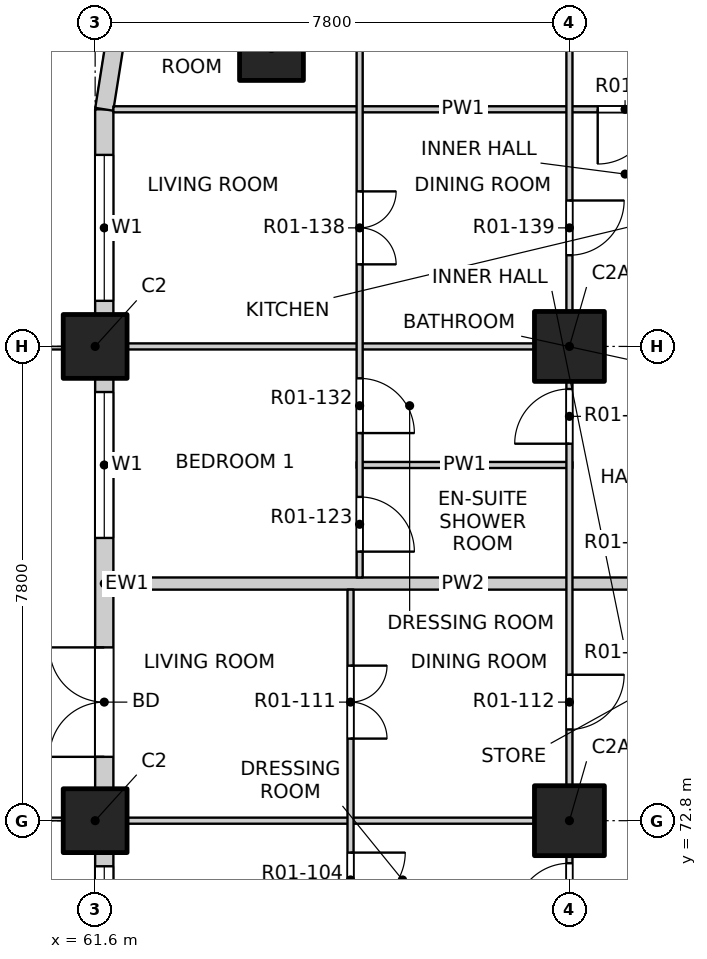
"""IFC4 building model, lengths in metres.
Left out: names, types, materials, properties, quantities, classifications, styles, units other than length and angle.
Written with IfcOpenShell. Run it as: python <this file> out.ifc"""

import sys

from ifc_helpers import new_model, si_unit, direction, frame, frame_2d, origin, origin_2d, place, context, subcontext, project, spatial, rectangle, extrude, element, fill, save


model = new_model("IFC4")
c1 = context("Model", 3, precision=1e-05, world=origin(), true_north=direction((0.0, 1.0)))
c2 = subcontext(c1, "Body", "Model", "MODEL_VIEW")
j1 = project(units=[si_unit("LENGTHUNIT", "METRE"), si_unit("PLANEANGLEUNIT", "RADIAN")], contexts=[c1])
p1 = place(None, origin())
s1 = spatial("IfcSite", under=j1, at=p1, CompositionType="ELEMENT")
p2 = place(p1, origin())
s2 = spatial("IfcBuilding", under=s1, at=p2, CompositionType="ELEMENT")
p3 = place(p2, frame((0.0, 0.0, 19.5)))
s3 = spatial("IfcBuildingStorey", under=s2, at=p3, CompositionType="ELEMENT", Elevation=19.5)
for number, where, z_axis, x_axis in (
    (1, (64.5, 85.5, -0.25), (0.0, 0.0, 1.0), (1.0, 0.0, 0.0)),
    (2, (61.6, 72.8, -0.25), (0.0, 0.0, 1.0), (1.0, 0.0, 0.0)),
    (3, (61.6, 80.6, -0.25), (0.0, 0.0, 1.0), (1.0, 0.0, 0.0)),
):
    element("IfcColumn", number, at=place(p3, frame(where, z_axis=z_axis, x_axis=x_axis)), inside=s3, PredefinedType="COLUMN", context=c2, shape_type="SweptSolid", body=[
        extrude(rectangle(XDim=1.05, YDim=1.05, at=origin_2d()), origin(), (0.0, 0.0, 1.0), 3.4),
    ])
for number, where, z_axis, x_axis in (
    (4, (69.4, 72.8, -0.25), (0.0, 0.0, 1.0), (1.0, 0.0, 0.0)),
    (5, (69.4, 80.6, -0.25), (0.0, 0.0, 1.0), (1.0, 0.0, 0.0)),
):
    element("IfcColumn", number, at=place(p3, frame(where, z_axis=z_axis, x_axis=x_axis)), inside=s3, PredefinedType="COLUMN", context=c2, shape_type="SweptSolid", body=[
        extrude(rectangle(XDim=1.15, YDim=1.15, at=origin_2d()), origin(), (0.0, 0.0, 1.0), 3.4),
    ])
p4 = place(p3, frame((61.75, 65.525, 0.0), z_axis=(0.0, 0.0, 1.0), x_axis=(0.0, 1.0, 0.0)))
e6 = element("IfcWall", 6, at=p4, inside=s3, PredefinedType="SOLIDWALL", context=c2, shape_type="SweptSolid", body=[
    extrude(rectangle(XDim=6.75, YDim=0.3, at=frame_2d((3.375, 0.0))), origin(), (0.0, 0.0, 1.0), 2.7),
])
p5 = place(p4, frame((0.225, 0.0, 0.9)))
e7 = element("IfcOpeningElement", 7, at=p5, cuts=e6, PredefinedType="OPENING", context=c2, shape_type="SweptSolid", body=[
    extrude(rectangle(XDim=2.4, YDim=1.8, at=frame_2d((1.2, 0.9))), frame((0.0, 0.16, 0.0), z_axis=(0.0, -1.0, 0.0), x_axis=(1.0, 0.0, 0.0)), (0.0, 0.0, 1.0), 0.32),
])
p6 = place(p4, frame((4.125, 0.0, 0.9)))
e8 = element("IfcOpeningElement", 8, at=p6, cuts=e6, PredefinedType="OPENING", context=c2, shape_type="SweptSolid", body=[
    extrude(rectangle(XDim=2.4, YDim=1.8, at=frame_2d((1.2, 0.9))), frame((0.0, 0.16, 0.0), z_axis=(0.0, -1.0, 0.0), x_axis=(1.0, 0.0, 0.0)), (0.0, 0.0, 1.0), 0.32),
])
p7 = place(p3, frame((61.75, 73.325, 0.0), z_axis=(0.0, 0.0, 1.0), x_axis=(0.0, 1.0, 0.0)))
e9 = element("IfcWall", 9, at=p7, inside=s3, PredefinedType="SOLIDWALL", context=c2, shape_type="SweptSolid", body=[
    extrude(rectangle(XDim=6.75, YDim=0.3, at=frame_2d((3.375, 0.0))), origin(), (0.0, 0.0, 1.0), 2.7),
])
p8 = place(p7, frame((0.525, 0.0, 0.0)))
e10 = element("IfcOpeningElement", 10, at=p8, cuts=e9, PredefinedType="OPENING", context=c2, shape_type="SweptSolid", body=[
    extrude(rectangle(XDim=1.8, YDim=2.4, at=frame_2d((0.9, 1.2))), frame((0.0, 0.16, 0.0), z_axis=(0.0, -1.0, 0.0), x_axis=(1.0, 0.0, 0.0)), (0.0, 0.0, 1.0), 0.32),
])
p9 = place(p7, frame((4.125, 0.0, 0.9)))
e11 = element("IfcOpeningElement", 11, at=p9, cuts=e9, PredefinedType="OPENING", context=c2, shape_type="SweptSolid", body=[
    extrude(rectangle(XDim=2.4, YDim=1.8, at=frame_2d((1.2, 0.9))), frame((0.0, 0.16, 0.0), z_axis=(0.0, -1.0, 0.0), x_axis=(1.0, 0.0, 0.0)), (0.0, 0.0, 1.0), 0.32),
])
p10 = place(p3, frame((61.75, 81.125, 0.0), z_axis=(0.0, 0.0, 1.0), x_axis=(0.0, 1.0, 0.0)))
e12 = element("IfcWall", 12, at=p10, inside=s3, PredefinedType="SOLIDWALL", context=c2, shape_type="SweptSolid", body=[
    extrude(rectangle(XDim=3.375, YDim=0.3, at=frame_2d((1.688, 0.0))), origin(), (0.0, 0.0, 1.0), 2.7),
])
p11 = place(p10, frame((0.225, 0.0, 0.9)))
e13 = element("IfcOpeningElement", 13, at=p11, cuts=e12, PredefinedType="OPENING", context=c2, shape_type="SweptSolid", body=[
    extrude(rectangle(XDim=2.4, YDim=1.8, at=frame_2d((1.2, 0.9))), frame((0.0, 0.16, 0.0), z_axis=(0.0, -1.0, 0.0), x_axis=(1.0, 0.0, 0.0)), (0.0, 0.0, 1.0), 0.32),
])
p12 = place(p3, frame((61.934, 85.659, 0.0), z_axis=(0.0, 0.0, 1.0), x_axis=(-0.156496880861, -0.987678452879, 0.0)))
e14 = element("IfcWall", 14, at=p12, inside=s3, PredefinedType="SOLIDWALL", context=c2, shape_type="SweptSolid", body=[
    extrude(rectangle(XDim=1.173, YDim=0.3, at=frame_2d((0.586, 0.0))), origin(), (0.0, 0.0, 1.0), 2.7),
])
p13 = place(p3, frame((61.9, 72.8, 0.0), z_axis=(0.0, 0.0, 1.0), x_axis=(1.0, 0.0, 0.0)))
e15 = element("IfcWall", 15, at=p13, inside=s3, PredefinedType="PARTITIONING", context=c2, shape_type="SweptSolid", body=[
    extrude(rectangle(XDim=7.55, YDim=0.1, at=frame_2d((3.775, 0.0))), origin(), (0.0, 0.0, 1.0), 2.55),
])
p14 = place(p3, frame((61.9, 76.7, 0.0), z_axis=(0.0, 0.0, 1.0), x_axis=(1.0, 0.0, 0.0)))
e16 = element("IfcWall", 16, at=p14, inside=s3, PredefinedType="PARTITIONING", context=c2, shape_type="SweptSolid", body=[
    extrude(rectangle(XDim=11.5, YDim=0.2, at=frame_2d((5.75, 0.0))), origin(), (0.0, 0.0, 1.0), 3.15),
])
p15 = place(p3, frame((65.9, 78.65, 0.0), z_axis=(0.0, 0.0, 1.0), x_axis=(1.0, 0.0, 0.0)))
e17 = element("IfcWall", 17, at=p15, inside=s3, PredefinedType="PARTITIONING", context=c2, shape_type="SweptSolid", body=[
    extrude(rectangle(XDim=3.55, YDim=0.1, at=frame_2d((1.775, 0.0))), origin(), (0.0, 0.0, 1.0), 3.15),
])
p16 = place(p3, frame((61.9, 80.6, 0.0), z_axis=(0.0, 0.0, 1.0), x_axis=(1.0, 0.0, 0.0)))
e18 = element("IfcWall", 18, at=p16, inside=s3, PredefinedType="PARTITIONING", context=c2, shape_type="SweptSolid", body=[
    extrude(rectangle(XDim=7.55, YDim=0.1, at=frame_2d((3.775, 0.0))), origin(), (0.0, 0.0, 1.0), 2.55),
])
p17 = place(p3, frame((61.9, 84.5, 0.0), z_axis=(0.0, 0.0, 1.0), x_axis=(1.0, 0.0, 0.0)))
e19 = element("IfcWall", 19, at=p17, inside=s3, PredefinedType="PARTITIONING", context=c2, shape_type="SweptSolid", body=[
    extrude(rectangle(XDim=11.5, YDim=0.1, at=frame_2d((5.75, 0.0))), origin(), (0.0, 0.0, 1.0), 3.15),
])
p18 = place(p17, frame((7.965, 0.0, 0.0)))
e20 = element("IfcOpeningElement", 20, at=p18, cuts=e19, PredefinedType="OPENING", context=c2, shape_type="SweptSolid", body=[
    extrude(rectangle(XDim=0.9, YDim=2.1, at=frame_2d((0.45, 1.05))), frame((0.0, 0.06, 0.0), z_axis=(0.0, -1.0, 0.0), x_axis=(1.0, 0.0, 0.0)), (0.0, 0.0, 1.0), 0.12),
])
p19 = place(p3, frame((65.8, 69.0, 0.0), z_axis=(0.0, 0.0, 1.0), x_axis=(0.0, 1.0, 0.0)))
e21 = element("IfcWall", 21, at=p19, inside=s3, PredefinedType="PARTITIONING", context=c2, shape_type="SweptSolid", body=[
    extrude(rectangle(XDim=7.6, YDim=0.1, at=frame_2d((3.8, 0.0))), origin(), (0.0, 0.0, 1.0), 3.15),
])
p20 = place(p19, frame((0.425, 0.0, 0.0)))
e22 = element("IfcOpeningElement", 22, at=p20, cuts=e21, PredefinedType="OPENING", context=c2, shape_type="SweptSolid", body=[
    extrude(rectangle(XDim=0.9, YDim=2.1, at=frame_2d((0.45, 1.05))), frame((0.0, 0.06, 0.0), z_axis=(0.0, -1.0, 0.0), x_axis=(1.0, 0.0, 0.0)), (0.0, 0.0, 1.0), 0.12),
])
p21 = place(p19, frame((2.375, 0.0, 0.0)))
e23 = element("IfcOpeningElement", 23, at=p21, cuts=e21, PredefinedType="OPENING", context=c2, shape_type="SweptSolid", body=[
    extrude(rectangle(XDim=0.9, YDim=2.1, at=frame_2d((0.45, 1.05))), frame((0.0, 0.06, 0.0), z_axis=(0.0, -1.0, 0.0), x_axis=(1.0, 0.0, 0.0)), (0.0, 0.0, 1.0), 0.12),
])
p22 = place(p19, frame((5.15, 0.0, 0.0)))
e24 = element("IfcOpeningElement", 24, at=p22, cuts=e21, PredefinedType="OPENING", context=c2, shape_type="SweptSolid", body=[
    extrude(rectangle(XDim=1.2, YDim=2.1, at=frame_2d((0.6, 1.05))), frame((0.0, 0.06, 0.0), z_axis=(0.0, -1.0, 0.0), x_axis=(1.0, 0.0, 0.0)), (0.0, 0.0, 1.0), 0.12),
])
p23 = place(p3, frame((65.95, 76.8, 0.0), z_axis=(0.0, 0.0, 1.0), x_axis=(0.0, 1.0, 0.0)))
e25 = element("IfcWall", 25, at=p23, inside=s3, PredefinedType="PARTITIONING", context=c2, shape_type="SweptSolid", body=[
    extrude(rectangle(XDim=11.3, YDim=0.1, at=frame_2d((5.65, 0.0))), origin(), (0.0, 0.0, 1.0), 3.15),
])
p24 = place(p23, frame((0.425, 0.0, 0.0)))
e26 = element("IfcOpeningElement", 26, at=p24, cuts=e25, PredefinedType="OPENING", context=c2, shape_type="SweptSolid", body=[
    extrude(rectangle(XDim=0.9, YDim=2.1, at=frame_2d((0.45, 1.05))), frame((0.0, 0.06, 0.0), z_axis=(0.0, -1.0, 0.0), x_axis=(1.0, 0.0, 0.0)), (0.0, 0.0, 1.0), 0.12),
])
p25 = place(p23, frame((2.375, 0.0, 0.0)))
e27 = element("IfcOpeningElement", 27, at=p25, cuts=e25, PredefinedType="OPENING", context=c2, shape_type="SweptSolid", body=[
    extrude(rectangle(XDim=0.9, YDim=2.1, at=frame_2d((0.45, 1.05))), frame((0.0, 0.06, 0.0), z_axis=(0.0, -1.0, 0.0), x_axis=(1.0, 0.0, 0.0)), (0.0, 0.0, 1.0), 0.12),
])
p26 = place(p23, frame((5.15, 0.0, 0.0)))
e28 = element("IfcOpeningElement", 28, at=p26, cuts=e25, PredefinedType="OPENING", context=c2, shape_type="SweptSolid", body=[
    extrude(rectangle(XDim=1.2, YDim=2.1, at=frame_2d((0.6, 1.05))), frame((0.0, 0.06, 0.0), z_axis=(0.0, -1.0, 0.0), x_axis=(1.0, 0.0, 0.0)), (0.0, 0.0, 1.0), 0.12),
])
p27 = place(p23, frame((9.05, 0.0, 0.0)))
e29 = element("IfcOpeningElement", 29, at=p27, cuts=e25, PredefinedType="OPENING", context=c2, shape_type="SweptSolid", body=[
    extrude(rectangle(XDim=1.2, YDim=2.1, at=frame_2d((0.6, 1.05))), frame((0.0, 0.06, 0.0), z_axis=(0.0, -1.0, 0.0), x_axis=(1.0, 0.0, 0.0)), (0.0, 0.0, 1.0), 0.12),
])
p28 = place(p3, frame((69.4, 49.4, 0.0), z_axis=(0.0, 0.0, 1.0), x_axis=(0.0, 1.0, 0.0)))
e30 = element("IfcWall", 30, at=p28, inside=s3, PredefinedType="PARTITIONING", context=c2, shape_type="SweptSolid", body=[
    extrude(rectangle(XDim=31.2, YDim=0.1, at=frame_2d((15.6, 0.0))), origin(), (0.0, 0.0, 1.0), 3.15),
])
p29 = place(p28, frame((1.5, 0.0, 0.0)))
e31 = element("IfcOpeningElement", 31, at=p29, cuts=e30, PredefinedType="OPENING", context=c2, shape_type="SweptSolid", body=[
    extrude(rectangle(XDim=0.9, YDim=2.1, at=frame_2d((0.45, 1.05))), frame((0.0, 0.06, 0.0), z_axis=(0.0, -1.0, 0.0), x_axis=(1.0, 0.0, 0.0)), (0.0, 0.0, 1.0), 0.12),
])
p30 = place(p28, frame((6.225, 0.0, 0.0)))
e32 = element("IfcOpeningElement", 32, at=p30, cuts=e30, PredefinedType="OPENING", context=c2, shape_type="SweptSolid", body=[
    extrude(rectangle(XDim=0.9, YDim=2.1, at=frame_2d((0.45, 1.05))), frame((0.0, 0.06, 0.0), z_axis=(0.0, -1.0, 0.0), x_axis=(1.0, 0.0, 0.0)), (0.0, 0.0, 1.0), 0.12),
])
p31 = place(p28, frame((10.275, 0.0, 0.0)))
e33 = element("IfcOpeningElement", 33, at=p31, cuts=e30, PredefinedType="OPENING", context=c2, shape_type="SweptSolid", body=[
    extrude(rectangle(XDim=0.9, YDim=2.1, at=frame_2d((0.45, 1.05))), frame((0.0, 0.06, 0.0), z_axis=(0.0, -1.0, 0.0), x_axis=(1.0, 0.0, 0.0)), (0.0, 0.0, 1.0), 0.12),
])
p32 = place(p28, frame((13.2, 0.0, 0.0)))
e34 = element("IfcOpeningElement", 34, at=p32, cuts=e30, PredefinedType="OPENING", context=c2, shape_type="SweptSolid", body=[
    extrude(rectangle(XDim=0.9, YDim=2.1, at=frame_2d((0.45, 1.05))), frame((0.0, 0.06, 0.0), z_axis=(0.0, -1.0, 0.0), x_axis=(1.0, 0.0, 0.0)), (0.0, 0.0, 1.0), 0.12),
])
p33 = place(p28, frame((18.075, 0.0, 0.0)))
e35 = element("IfcOpeningElement", 35, at=p33, cuts=e30, PredefinedType="OPENING", context=c2, shape_type="SweptSolid", body=[
    extrude(rectangle(XDim=0.9, YDim=2.1, at=frame_2d((0.45, 1.05))), frame((0.0, 0.06, 0.0), z_axis=(0.0, -1.0, 0.0), x_axis=(1.0, 0.0, 0.0)), (0.0, 0.0, 1.0), 0.12),
])
p34 = place(p28, frame((21.8, 0.0, 0.0)))
e36 = element("IfcOpeningElement", 36, at=p34, cuts=e30, PredefinedType="OPENING", context=c2, shape_type="SweptSolid", body=[
    extrude(rectangle(XDim=0.9, YDim=2.1, at=frame_2d((0.45, 1.05))), frame((0.0, 0.06, 0.0), z_axis=(0.0, -1.0, 0.0), x_axis=(1.0, 0.0, 0.0)), (0.0, 0.0, 1.0), 0.12),
])
p35 = place(p28, frame((24.9, 0.0, 0.0)))
e37 = element("IfcOpeningElement", 37, at=p35, cuts=e30, PredefinedType="OPENING", context=c2, shape_type="SweptSolid", body=[
    extrude(rectangle(XDim=0.9, YDim=2.1, at=frame_2d((0.45, 1.05))), frame((0.0, 0.06, 0.0), z_axis=(0.0, -1.0, 0.0), x_axis=(1.0, 0.0, 0.0)), (0.0, 0.0, 1.0), 0.12),
])
p36 = place(p28, frame((29.6, 0.0, 0.0)))
e38 = element("IfcOpeningElement", 38, at=p36, cuts=e30, PredefinedType="OPENING", context=c2, shape_type="SweptSolid", body=[
    extrude(rectangle(XDim=0.9, YDim=2.1, at=frame_2d((0.45, 1.05))), frame((0.0, 0.06, 0.0), z_axis=(0.0, -1.0, 0.0), x_axis=(1.0, 0.0, 0.0)), (0.0, 0.0, 1.0), 0.12),
])
p37 = place(p3, frame((69.4, 80.6, 0.0), z_axis=(0.0, 0.0, 1.0), x_axis=(0.0, 1.0, 0.0)))
e39 = element("IfcWall", 39, at=p37, inside=s3, PredefinedType="PARTITIONING", context=c2, shape_type="SweptSolid", body=[
    extrude(rectangle(XDim=7.5, YDim=0.1, at=frame_2d((3.75, 0.0))), origin(), (0.0, 0.0, 1.0), 2.55),
])
p38 = place(p37, frame((1.5, 0.0, 0.0)))
e40 = element("IfcOpeningElement", 40, at=p38, cuts=e39, PredefinedType="OPENING", context=c2, shape_type="SweptSolid", body=[
    extrude(rectangle(XDim=0.9, YDim=2.1, at=frame_2d((0.45, 1.05))), frame((0.0, 0.06, 0.0), z_axis=(0.0, -1.0, 0.0), x_axis=(1.0, 0.0, 0.0)), (0.0, 0.0, 1.0), 0.12),
])
p39 = place(p37, frame((5.4, 0.0, 0.0)))
e41 = element("IfcOpeningElement", 41, at=p39, cuts=e39, PredefinedType="OPENING", context=c2, shape_type="SweptSolid", body=[
    extrude(rectangle(XDim=0.9, YDim=2.1, at=frame_2d((0.45, 1.05))), frame((0.0, 0.06, 0.0), z_axis=(0.0, -1.0, 0.0), x_axis=(1.0, 0.0, 0.0)), (0.0, 0.0, 1.0), 0.12),
])
p40 = place(p6, origin())
e42 = element("IfcWindow", 42, at=p40, inside=s3, PartitioningType="DOUBLE_PANEL_VERTICAL", PredefinedType="WINDOW", context=c2, shape_type="SweptSolid", body=[
    extrude(rectangle(XDim=2.4, YDim=1.8, at=frame_2d((1.2, 0.9))), frame((0.0, 0.03, 0.0), z_axis=(0.0, -1.0, 0.0), x_axis=(1.0, 0.0, 0.0)), (0.0, 0.0, 1.0), 0.06),
])
fill(e8, e42)
p41 = place(p8, origin())
e43 = element("IfcDoor", 43, at=p41, inside=s3, OperationType="DOUBLE_DOOR_SINGLE_SWING", PredefinedType="DOOR", context=c2, shape_type="SweptSolid", body=[
    extrude(rectangle(XDim=1.8, YDim=2.4, at=frame_2d((0.9, 1.2))), frame((0.0, 0.025, 0.0), z_axis=(0.0, -1.0, 0.0), x_axis=(1.0, 0.0, 0.0)), (0.0, 0.0, 1.0), 0.05),
])
fill(e10, e43)
p42 = place(p9, origin())
e44 = element("IfcWindow", 44, at=p42, inside=s3, PartitioningType="DOUBLE_PANEL_VERTICAL", PredefinedType="WINDOW", context=c2, shape_type="SweptSolid", body=[
    extrude(rectangle(XDim=2.4, YDim=1.8, at=frame_2d((1.2, 0.9))), frame((0.0, 0.03, 0.0), z_axis=(0.0, -1.0, 0.0), x_axis=(1.0, 0.0, 0.0)), (0.0, 0.0, 1.0), 0.06),
])
fill(e11, e44)
p43 = place(p11, origin())
e45 = element("IfcWindow", 45, at=p43, inside=s3, PartitioningType="DOUBLE_PANEL_VERTICAL", PredefinedType="WINDOW", context=c2, shape_type="SweptSolid", body=[
    extrude(rectangle(XDim=2.4, YDim=1.8, at=frame_2d((1.2, 0.9))), frame((0.0, 0.03, 0.0), z_axis=(0.0, -1.0, 0.0), x_axis=(1.0, 0.0, 0.0)), (0.0, 0.0, 1.0), 0.06),
])
fill(e13, e45)
p44 = place(p34, origin())
e46 = element("IfcDoor", 46, at=p44, inside=s3, OperationType="SINGLE_SWING_LEFT", PredefinedType="DOOR", context=c2, shape_type="SweptSolid", body=[
    extrude(rectangle(XDim=0.9, YDim=2.1, at=frame_2d((0.45, 1.05))), frame((0.0, 0.025, 0.0), z_axis=(0.0, -1.0, 0.0), x_axis=(1.0, 0.0, 0.0)), (0.0, 0.0, 1.0), 0.05),
])
fill(e36, e46)
p45 = place(p21, origin())
e47 = element("IfcDoor", 47, at=p45, inside=s3, OperationType="SINGLE_SWING_LEFT", PredefinedType="DOOR", context=c2, shape_type="SweptSolid", body=[
    extrude(rectangle(XDim=0.9, YDim=2.1, at=frame_2d((0.45, 1.05))), frame((0.0, 0.025, 0.0), z_axis=(0.0, -1.0, 0.0), x_axis=(1.0, 0.0, 0.0)), (0.0, 0.0, 1.0), 0.05),
])
fill(e23, e47)
p46 = place(p22, origin())
e48 = element("IfcDoor", 48, at=p46, inside=s3, OperationType="DOUBLE_DOOR_SINGLE_SWING", PredefinedType="DOOR", context=c2, shape_type="SweptSolid", body=[
    extrude(rectangle(XDim=1.2, YDim=2.1, at=frame_2d((0.6, 1.05))), frame((0.0, 0.025, 0.0), z_axis=(0.0, -1.0, 0.0), x_axis=(1.0, 0.0, 0.0)), (0.0, 0.0, 1.0), 0.05),
])
fill(e24, e48)
p47 = place(p35, origin())
e49 = element("IfcDoor", 49, at=p47, inside=s3, OperationType="SINGLE_SWING_LEFT", PredefinedType="DOOR", context=c2, shape_type="SweptSolid", body=[
    extrude(rectangle(XDim=0.9, YDim=2.1, at=frame_2d((0.45, 1.05))), frame((0.0, 0.025, 0.0), z_axis=(0.0, -1.0, 0.0), x_axis=(1.0, 0.0, 0.0)), (0.0, 0.0, 1.0), 0.05),
])
fill(e37, e49)
p48 = place(p24, origin())
e50 = element("IfcDoor", 50, at=p48, inside=s3, OperationType="SINGLE_SWING_RIGHT", PredefinedType="DOOR", context=c2, shape_type="SweptSolid", body=[
    extrude(rectangle(XDim=0.9, YDim=2.1, at=frame_2d((0.45, 1.05))), frame((0.0, 0.025, 0.0), z_axis=(0.0, -1.0, 0.0), x_axis=(1.0, 0.0, 0.0)), (0.0, 0.0, 1.0), 0.05),
])
fill(e26, e50)
p49 = place(p36, origin())
e51 = element("IfcDoor", 51, at=p49, inside=s3, OperationType="SINGLE_SWING_LEFT", PredefinedType="DOOR", context=c2, shape_type="SweptSolid", body=[
    extrude(rectangle(XDim=0.9, YDim=2.1, at=frame_2d((0.45, 1.05))), frame((0.0, 0.025, 0.0), z_axis=(0.0, -1.0, 0.0), x_axis=(1.0, 0.0, 0.0)), (0.0, 0.0, 1.0), 0.05),
])
fill(e38, e51)
p50 = place(p25, origin())
e52 = element("IfcDoor", 52, at=p50, inside=s3, OperationType="SINGLE_SWING_RIGHT", PredefinedType="DOOR", context=c2, shape_type="SweptSolid", body=[
    extrude(rectangle(XDim=0.9, YDim=2.1, at=frame_2d((0.45, 1.05))), frame((0.0, 0.025, 0.0), z_axis=(0.0, -1.0, 0.0), x_axis=(1.0, 0.0, 0.0)), (0.0, 0.0, 1.0), 0.05),
])
fill(e27, e52)
p51 = place(p26, origin())
e53 = element("IfcDoor", 53, at=p51, inside=s3, OperationType="DOUBLE_DOOR_SINGLE_SWING", PredefinedType="DOOR", context=c2, shape_type="SweptSolid", body=[
    extrude(rectangle(XDim=1.2, YDim=2.1, at=frame_2d((0.6, 1.05))), frame((0.0, 0.025, 0.0), z_axis=(0.0, -1.0, 0.0), x_axis=(1.0, 0.0, 0.0)), (0.0, 0.0, 1.0), 0.05),
])
fill(e28, e53)
p52 = place(p38, origin())
e54 = element("IfcDoor", 54, at=p52, inside=s3, OperationType="SINGLE_SWING_LEFT", PredefinedType="DOOR", context=c2, shape_type="SweptSolid", body=[
    extrude(rectangle(XDim=0.9, YDim=2.1, at=frame_2d((0.45, 1.05))), frame((0.0, 0.025, 0.0), z_axis=(0.0, -1.0, 0.0), x_axis=(1.0, 0.0, 0.0)), (0.0, 0.0, 1.0), 0.05),
])
fill(e40, e54)
p53 = place(p18, origin())
e55 = element("IfcDoor", 55, at=p53, inside=s3, OperationType="SINGLE_SWING_RIGHT", PredefinedType="DOOR", context=c2, shape_type="SweptSolid", body=[
    extrude(rectangle(XDim=0.9, YDim=2.1, at=frame_2d((0.45, 1.05))), frame((0.0, 0.025, 0.0), z_axis=(0.0, -1.0, 0.0), x_axis=(1.0, 0.0, 0.0)), (0.0, 0.0, 1.0), 0.05),
])
fill(e20, e55)
save(model, sys.argv[1])
